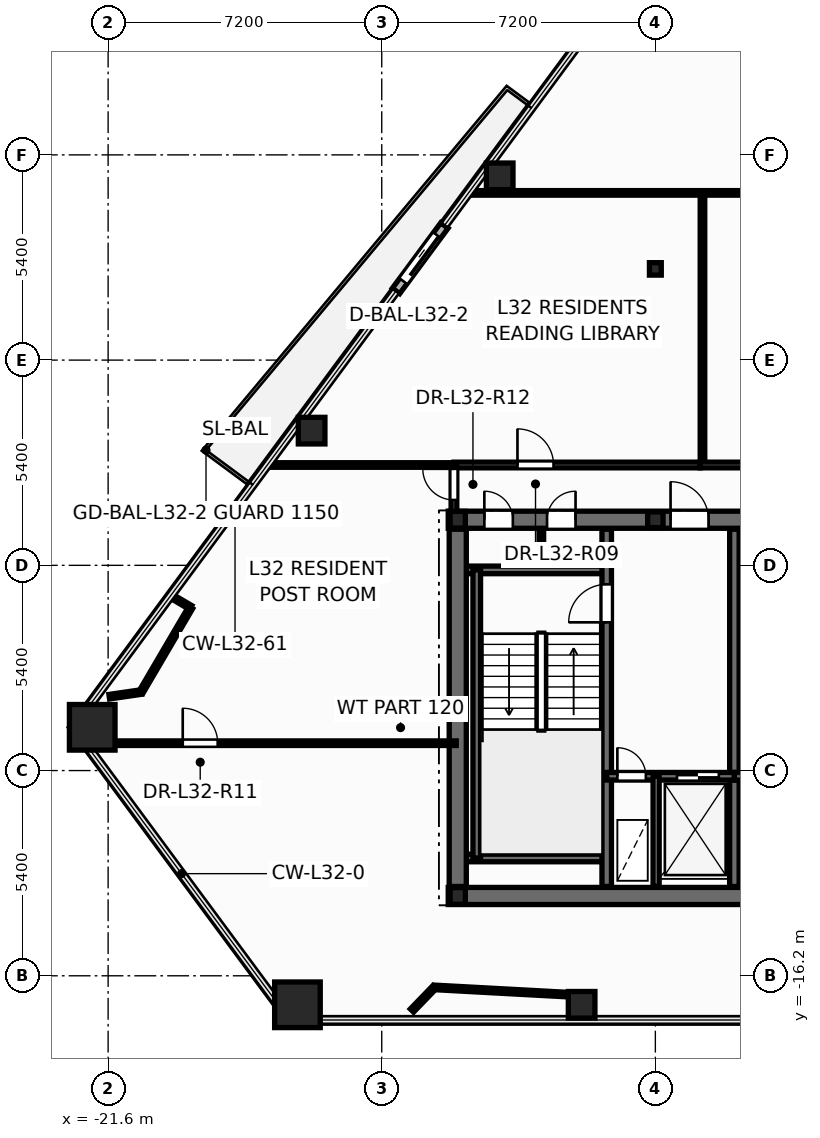
"""IFC4 building model, lengths in metres.
Left out: names, types, materials, properties, quantities, classifications, styles, units other than length and angle.
Written with IfcOpenShell. Run it as: python <this file> out.ifc"""

import sys

from ifc_helpers import new_model, si_unit, direction, frame, frame_2d, origin, origin_2d, place, context, subcontext, project, spatial, rectangle, hollow_rectangle, hollow_circle, i_section, extrude, element, fill, save


model = new_model("IFC4")
c1 = context("Model", 3, precision=1e-05, world=origin(), true_north=direction((0.0, 1.0)))
c2 = subcontext(c1, "Body", "Model", "MODEL_VIEW")
j1 = project(units=[si_unit("LENGTHUNIT", "METRE"), si_unit("PLANEANGLEUNIT", "RADIAN")], contexts=[c1])
p1 = place(None, origin())
s1 = spatial("IfcSite", under=j1, at=p1, CompositionType="ELEMENT")
p2 = place(p1, origin())
s2 = spatial("IfcBuilding", under=s1, at=p2, CompositionType="ELEMENT")
p3 = place(p2, frame((0.0, 0.0, 125.7)))
s3 = spatial("IfcBuildingStorey", under=s2, at=p3, CompositionType="ELEMENT", Elevation=125.7)
for number, where, z_axis, x_axis in (
    (1, (-22.019, -9.662, 0.0), (0.0, 0.0, 1.0), (1.0, 0.0, 0.0)),
    (2, (-16.618, -16.963, 0.0), (0.0, 0.0, 1.0), (1.0, 0.0, 0.0)),
):
    element("IfcColumn", number, at=place(p3, frame(where, z_axis=z_axis, x_axis=x_axis)), inside=s3, PredefinedType="COLUMN", context=c2, shape_type="SweptSolid", body=[
        extrude(hollow_rectangle(XDim=1.2, YDim=1.2, WallThickness=0.055, at=origin_2d()), origin(), (0.0, 0.0, 1.0), 3.6),
    ])
for number, where, z_axis, x_axis in (
    (3, (-9.14, -16.963, 0.0), (0.0, 0.0, 1.0), (1.0, 0.0, 0.0)),
    (4, (-11.296, 4.836, 0.0), (0.0, 0.0, 1.0), (1.0, 0.0, 0.0)),
    (5, (-16.245, -1.856, 0.0), (0.0, 0.0, 1.0), (1.0, 0.0, 0.0)),
):
    element("IfcColumn", number, at=place(p3, frame(where, z_axis=z_axis, x_axis=x_axis)), inside=s3, PredefinedType="COLUMN", context=c2, shape_type="SweptSolid", body=[
        extrude(hollow_circle(Radius=0.35, WallThickness=0.03, at=origin_2d()), origin(), (0.0, 0.0, 1.0), 3.6),
    ])
for number, where, z_axis, x_axis in (
    (6, (-12.4, -14.1, 0.0), (0.0, 0.0, 1.0), (1.0, 0.0, 0.0)),
    (7, (-12.4, -4.2, 0.0), (0.0, 0.0, 1.0), (1.0, 0.0, 0.0)),
):
    element("IfcColumn", number, at=place(p3, frame(where, z_axis=z_axis, x_axis=x_axis)), inside=s3, PredefinedType="COLUMN", context=c2, shape_type="SweptSolid", body=[
        extrude(i_section(OverallWidth=0.4, OverallDepth=0.44, WebThickness=0.028, FlangeThickness=0.04, at=origin_2d()), origin(), (0.0, 0.0, 1.0), 3.6),
    ])
p4 = place(p3, frame((-7.2, -4.2, 0.0), z_axis=(0.0, 0.0, 1.0), x_axis=(1.0, 0.0, 0.0)))
e8 = element("IfcColumn", 8, at=p4, inside=s3, PredefinedType="PILASTER", context=c2, shape_type="SweptSolid", body=[
    extrude(i_section(OverallWidth=0.405, OverallDepth=0.414, WebThickness=0.022, FlangeThickness=0.032, at=origin_2d()), origin(), (0.0, 0.0, 1.0), 3.6),
])
p5 = place(p3, frame((-7.2, 2.4, 0.0), z_axis=(0.0, 0.0, 1.0), x_axis=(1.0, 0.0, 0.0)))
e9 = element("IfcColumn", 9, at=p5, inside=s3, PredefinedType="COLUMN", context=c2, shape_type="SweptSolid", body=[
    extrude(i_section(OverallWidth=0.311, OverallDepth=0.327, WebThickness=0.016, FlangeThickness=0.025, at=origin_2d()), origin(), (0.0, 0.0, 1.0), 3.6),
])
p6 = place(p3, frame((-12.751, 3.541, -0.015), z_axis=(0.0, 0.0, 1.0), x_axis=(-0.594638042479, -0.80399353134, 0.0)))
e10 = element("IfcWall", 10, at=p6, inside=s3, PredefinedType="STANDARD", context=c2, shape_type="SweptSolid", body=[
    extrude(rectangle(XDim=2.14, YDim=0.24, at=frame_2d((1.07, 0.0))), origin(), (0.0, 0.0, 1.0), 2.807),
])
p7 = place(p6, frame((0.32, 0.0, 0.015)))
e11 = element("IfcOpeningElement", 11, at=p7, cuts=e10, PredefinedType="OPENING", context=c2, shape_type="SweptSolid", body=[
    extrude(rectangle(XDim=1.506, YDim=2.204, at=frame_2d((0.75, 1.102))), frame((0.0, 0.13, 0.0), z_axis=(0.0, -1.0, 0.0), x_axis=(1.0, 0.0, 0.0)), (0.0, 0.0, 1.0), 0.26),
])
p8 = place(p3, frame((-5.12, -9.45, 0.0), z_axis=(0.0, 0.0, 1.0), x_axis=(1.0, 0.0, 0.0)))
e12 = element("IfcWall", 12, at=p8, inside=s3, PredefinedType="PARTITIONING", context=c2, shape_type="SweptSolid", body=[
    extrude(rectangle(XDim=3.06, YDim=0.15, at=frame_2d((1.53, 0.0))), origin(), (0.0, 0.0, 1.0), 3.35),
])
p9 = place(p3, frame((-10.2, -5.52, 0.0), z_axis=(0.0, 0.0, 1.0), x_axis=(0.0, 1.0, 0.0)))
e13 = element("IfcWall", 13, at=p9, inside=s3, PredefinedType="PARTITIONING", context=c2, shape_type="SweptSolid", body=[
    extrude(rectangle(XDim=1.12, YDim=0.12, at=frame_2d((0.56, 0.0))), origin(), (0.0, 0.0, 1.0), 3.35),
])
p10 = place(p3, frame((-12.65, -14.1, 0.0), z_axis=(0.0, 0.0, 1.0), x_axis=(1.0, 0.0, 0.0)))
e14 = element("IfcWall", 14, at=p10, inside=s3, PredefinedType="SHEAR", context=c2, shape_type="SweptSolid", body=[
    extrude(rectangle(XDim=25.3, YDim=0.45, at=frame_2d((12.65, 0.0))), origin(), (0.0, 0.0, 1.0), 3.6),
])
p11 = place(p3, frame((-12.65, -4.2, 0.0), z_axis=(0.0, 0.0, 1.0), x_axis=(1.0, 0.0, 0.0)))
e15 = element("IfcWall", 15, at=p11, inside=s3, PredefinedType="SHEAR", context=c2, shape_type="SweptSolid", body=[
    extrude(rectangle(XDim=25.3, YDim=0.45, at=frame_2d((12.65, 0.0))), origin(), (0.0, 0.0, 1.0), 3.6),
])
p12 = place(p11, frame((0.95, 0.0, 0.0)))
e16 = element("IfcOpeningElement", 16, at=p12, cuts=e15, PredefinedType="OPENING", context=c2, shape_type="SweptSolid", body=[
    extrude(rectangle(XDim=0.756, YDim=2.054, at=frame_2d((0.375, 1.027))), frame((0.0, 0.235, 0.0), z_axis=(0.0, -1.0, 0.0), x_axis=(1.0, 0.0, 0.0)), (0.0, 0.0, 1.0), 0.47),
])
p13 = place(p11, frame((2.6, 0.0, 0.0)))
e17 = element("IfcOpeningElement", 17, at=p13, cuts=e15, PredefinedType="OPENING", context=c2, shape_type="SweptSolid", body=[
    extrude(rectangle(XDim=0.756, YDim=2.054, at=frame_2d((0.375, 1.027))), frame((0.0, 0.235, 0.0), z_axis=(0.0, -1.0, 0.0), x_axis=(1.0, 0.0, 0.0)), (0.0, 0.0, 1.0), 0.47),
])
p14 = place(p11, frame((21.85, 0.0, 0.0)))
e18 = element("IfcOpeningElement", 18, at=p14, cuts=e15, PredefinedType="OPENING", context=c2, shape_type="SweptSolid", body=[
    extrude(rectangle(XDim=0.756, YDim=2.054, at=frame_2d((0.375, 1.027))), frame((0.0, 0.235, 0.0), z_axis=(0.0, -1.0, 0.0), x_axis=(1.0, 0.0, 0.0)), (0.0, 0.0, 1.0), 0.47),
])
p15 = place(p11, frame((23.5, 0.0, 0.0)))
e19 = element("IfcOpeningElement", 19, at=p15, cuts=e15, PredefinedType="OPENING", context=c2, shape_type="SweptSolid", body=[
    extrude(rectangle(XDim=0.756, YDim=2.054, at=frame_2d((0.375, 1.027))), frame((0.0, 0.235, 0.0), z_axis=(0.0, -1.0, 0.0), x_axis=(1.0, 0.0, 0.0)), (0.0, 0.0, 1.0), 0.47),
])
p16 = place(p11, frame((5.85, 0.0, 0.0)))
e20 = element("IfcOpeningElement", 20, at=p16, cuts=e15, PredefinedType="OPENING", context=c2, shape_type="SweptSolid", body=[
    extrude(rectangle(XDim=1.006, YDim=2.104, at=frame_2d((0.5, 1.052))), frame((0.0, 0.235, 0.0), z_axis=(0.0, -1.0, 0.0), x_axis=(1.0, 0.0, 0.0)), (0.0, 0.0, 1.0), 0.47),
])
p17 = place(p11, frame((10.35, 0.0, 0.0)))
e21 = element("IfcOpeningElement", 21, at=p17, cuts=e15, PredefinedType="OPENING", context=c2, shape_type="SweptSolid", body=[
    extrude(rectangle(XDim=1.406, YDim=2.154, at=frame_2d((0.7, 1.077))), frame((0.0, 0.235, 0.0), z_axis=(0.0, -1.0, 0.0), x_axis=(1.0, 0.0, 0.0)), (0.0, 0.0, 1.0), 0.47),
])
p18 = place(p11, frame((18.45, 0.0, 0.0)))
e22 = element("IfcOpeningElement", 22, at=p18, cuts=e15, PredefinedType="OPENING", context=c2, shape_type="SweptSolid", body=[
    extrude(rectangle(XDim=1.006, YDim=2.104, at=frame_2d((0.5, 1.052))), frame((0.0, 0.235, 0.0), z_axis=(0.0, -1.0, 0.0), x_axis=(1.0, 0.0, 0.0)), (0.0, 0.0, 1.0), 0.47),
])
for number, where, z_axis, x_axis in (
    (23, (-12.35, -5.52, 0.0), (0.0, 0.0, 1.0), (1.0, 0.0, 0.0)),
    (24, (-12.35, -13.1, 0.0), (0.0, 0.0, 1.0), (1.0, 0.0, 0.0)),
):
    element("IfcWall", number, at=place(p3, frame(where, z_axis=z_axis, x_axis=x_axis)), inside=s3, PredefinedType="SOLIDWALL", context=c2, shape_type="SweptSolid", body=[
        extrude(rectangle(XDim=3.87, YDim=0.2, at=frame_2d((1.935, 0.0))), origin(), (0.0, 0.0, 1.0), 3.6),
    ])
p19 = place(p3, frame((-11.9, -13.1, 0.0), z_axis=(0.0, 0.0, 1.0), x_axis=(0.0, 1.0, 0.0)))
e25 = element("IfcWall", 25, at=p19, inside=s3, PredefinedType="SOLIDWALL", context=c2, shape_type="SweptSolid", body=[
    extrude(rectangle(XDim=7.58, YDim=0.2, at=frame_2d((3.79, 0.0))), origin(), (0.0, 0.0, 1.0), 3.6),
])
p20 = place(p3, frame((-8.48, -13.85, 0.0), z_axis=(0.0, 0.0, 1.0), x_axis=(0.0, 1.0, 0.0)))
e26 = element("IfcWall", 26, at=p20, inside=s3, PredefinedType="SHEAR", context=c2, shape_type="SweptSolid", body=[
    extrude(rectangle(XDim=9.4, YDim=0.25, at=frame_2d((4.7, 0.0))), origin(), (0.0, 0.0, 1.0), 3.6),
])
p21 = place(p20, frame((6.95, 0.0, 0.0)))
e27 = element("IfcOpeningElement", 27, at=p21, cuts=e26, PredefinedType="OPENING", context=c2, shape_type="SweptSolid", body=[
    extrude(rectangle(XDim=1.006, YDim=2.104, at=frame_2d((0.5, 1.052))), frame((0.0, 0.135, 0.0), z_axis=(0.0, -1.0, 0.0), x_axis=(1.0, 0.0, 0.0)), (0.0, 0.0, 1.0), 0.27),
])
p22 = place(p3, frame((-5.12, -13.85, 0.0), z_axis=(0.0, 0.0, 1.0), x_axis=(0.0, 1.0, 0.0)))
e28 = element("IfcWall", 28, at=p22, inside=s3, PredefinedType="SHEAR", context=c2, shape_type="SweptSolid", body=[
    extrude(rectangle(XDim=9.4, YDim=0.25, at=frame_2d((4.7, 0.0))), origin(), (0.0, 0.0, 1.0), 3.6),
])
p23 = place(p3, frame((-8.48, -10.95, 0.0), z_axis=(0.0, 0.0, 1.0), x_axis=(1.0, 0.0, 0.0)))
e29 = element("IfcWall", 29, at=p23, inside=s3, PredefinedType="SOLIDWALL", context=c2, shape_type="SweptSolid", body=[
    extrude(rectangle(XDim=3.36, YDim=0.2, at=frame_2d((1.68, 0.0))), origin(), (0.0, 0.0, 1.0), 3.6),
])
p24 = place(p23, frame((0.28, 0.0, 0.0)))
e30 = element("IfcOpeningElement", 30, at=p24, cuts=e29, PredefinedType="OPENING", context=c2, shape_type="SweptSolid", body=[
    extrude(rectangle(XDim=0.756, YDim=2.054, at=frame_2d((0.375, 1.027))), frame((0.0, 0.11, 0.0), z_axis=(0.0, -1.0, 0.0), x_axis=(1.0, 0.0, 0.0)), (0.0, 0.0, 1.0), 0.22),
])
p25 = place(p23, frame((1.85, 0.0, 0.0)))
e31 = element("IfcOpeningElement", 31, at=p25, cuts=e29, PredefinedType="OPENING", context=c2, shape_type="SweptSolid", body=[
    extrude(rectangle(XDim=1.106, YDim=2.104, at=frame_2d((0.55, 1.052))), frame((0.0, 0.11, 0.0), z_axis=(0.0, -1.0, 0.0), x_axis=(1.0, 0.0, 0.0)), (0.0, 0.0, 1.0), 0.22),
])
p26 = place(p3, frame((-5.12, -10.95, 0.0), z_axis=(0.0, 0.0, 1.0), x_axis=(1.0, 0.0, 0.0)))
e32 = element("IfcWall", 32, at=p26, inside=s3, PredefinedType="SOLIDWALL", context=c2, shape_type="SweptSolid", body=[
    extrude(rectangle(XDim=10.24, YDim=0.2, at=frame_2d((5.12, 0.0))), origin(), (0.0, 0.0, 1.0), 3.6),
])
p27 = place(p26, frame((0.6, 0.0, 0.0)))
e33 = element("IfcOpeningElement", 33, at=p27, cuts=e32, PredefinedType="OPENING", context=c2, shape_type="SweptSolid", body=[
    extrude(rectangle(XDim=1.106, YDim=2.104, at=frame_2d((0.55, 1.052))), frame((0.0, 0.11, 0.0), z_axis=(0.0, -1.0, 0.0), x_axis=(1.0, 0.0, 0.0)), (0.0, 0.0, 1.0), 0.22),
])
p28 = place(p26, frame((2.67, 0.0, 0.0)))
e34 = element("IfcOpeningElement", 34, at=p28, cuts=e32, PredefinedType="OPENING", context=c2, shape_type="SweptSolid", body=[
    extrude(rectangle(XDim=1.106, YDim=2.104, at=frame_2d((0.55, 1.052))), frame((0.0, 0.11, 0.0), z_axis=(0.0, -1.0, 0.0), x_axis=(1.0, 0.0, 0.0)), (0.0, 0.0, 1.0), 0.22),
])
p29 = place(p26, frame((4.57, 0.0, 0.0)))
e35 = element("IfcOpeningElement", 35, at=p29, cuts=e32, PredefinedType="OPENING", context=c2, shape_type="SweptSolid", body=[
    extrude(rectangle(XDim=1.106, YDim=2.104, at=frame_2d((0.55, 1.052))), frame((0.0, 0.11, 0.0), z_axis=(0.0, -1.0, 0.0), x_axis=(1.0, 0.0, 0.0)), (0.0, 0.0, 1.0), 0.22),
])
p30 = place(p26, frame((6.47, 0.0, 0.0)))
e36 = element("IfcOpeningElement", 36, at=p30, cuts=e32, PredefinedType="OPENING", context=c2, shape_type="SweptSolid", body=[
    extrude(rectangle(XDim=1.106, YDim=2.104, at=frame_2d((0.55, 1.052))), frame((0.0, 0.11, 0.0), z_axis=(0.0, -1.0, 0.0), x_axis=(1.0, 0.0, 0.0)), (0.0, 0.0, 1.0), 0.22),
])
p31 = place(p26, frame((8.54, 0.0, 0.0)))
e37 = element("IfcOpeningElement", 37, at=p31, cuts=e32, PredefinedType="OPENING", context=c2, shape_type="SweptSolid", body=[
    extrude(rectangle(XDim=1.106, YDim=2.104, at=frame_2d((0.55, 1.052))), frame((0.0, 0.11, 0.0), z_axis=(0.0, -1.0, 0.0), x_axis=(1.0, 0.0, 0.0)), (0.0, 0.0, 1.0), 0.22),
])
p32 = place(p3, frame((-7.18, -13.85, 0.0), z_axis=(0.0, 0.0, 1.0), x_axis=(0.0, 1.0, 0.0)))
e38 = element("IfcWall", 38, at=p32, inside=s3, PredefinedType="PARTITIONING", context=c2, shape_type="SweptSolid", body=[
    extrude(rectangle(XDim=2.9, YDim=0.16, at=frame_2d((1.45, 0.0))), origin(), (0.0, 0.0, 1.0), 2.475),
])
p33 = place(p3, frame((-12.4, -13.85, 0.0), z_axis=(0.0, 0.0, 1.0), x_axis=(0.0, 1.0, 0.0)))
e39 = element("IfcWall", 39, at=p33, inside=s3, PredefinedType="SHEAR", context=c2, shape_type="SweptSolid", body=[
    extrude(rectangle(XDim=9.4, YDim=0.45, at=frame_2d((4.7, 0.0))), origin(), (0.0, 0.0, 1.0), 3.6),
])
p34 = place(p3, frame((-22.207, -10.08, 0.0), z_axis=(0.0, 0.0, 1.0), x_axis=(1.0, 0.0, 0.0)))
e40 = element("IfcWall", 40, at=p34, inside=s3, PredefinedType="PARTITIONING", context=c2, shape_type="SweptSolid", body=[
    extrude(rectangle(XDim=9.767, YDim=0.12, at=frame_2d((4.883, 0.0))), origin(), (0.0, 0.0, 1.0), 2.792),
])
p35 = place(p34, frame((2.57, 0.0, 0.0)))
e41 = element("IfcOpeningElement", 41, at=p35, cuts=e40, PredefinedType="OPENING", context=c2, shape_type="SweptSolid", body=[
    extrude(rectangle(XDim=0.926, YDim=2.104, at=frame_2d((0.46, 1.052))), frame((0.0, 0.07, 0.0), z_axis=(0.0, -1.0, 0.0), x_axis=(1.0, 0.0, 0.0)), (0.0, 0.0, 1.0), 0.14),
])
p36 = place(p3, frame((-5.96, -2.76, 0.0), z_axis=(0.0, 0.0, 1.0), x_axis=(0.0, 1.0, 0.0)))
e42 = element("IfcWall", 42, at=p36, inside=s3, PredefinedType="PARTITIONING", context=c2, shape_type="SweptSolid", body=[
    extrude(rectangle(XDim=7.16, YDim=0.12, at=frame_2d((3.58, 0.0))), origin(), (0.0, 0.0, 1.0), 2.325),
])
p37 = place(p3, frame((-6.02, -2.76, 0.0), z_axis=(0.0, 0.0, 1.0), x_axis=(1.0, 0.0, 0.0)))
e43 = element("IfcWall", 43, at=p37, inside=s3, PredefinedType="PARTITIONING", context=c2, shape_type="SweptSolid", body=[
    extrude(rectangle(XDim=6.66, YDim=0.15, at=frame_2d((3.33, 0.0))), origin(), (0.0, 0.0, 1.0), 2.325),
])
p38 = place(p3, frame((-12.116, 4.4, 0.0), z_axis=(0.0, 0.0, 1.0), x_axis=(1.0, 0.0, 0.0)))
e44 = element("IfcWall", 44, at=p38, inside=s3, PredefinedType="PARTITIONING", context=c2, shape_type="SweptSolid", body=[
    extrude(rectangle(XDim=12.756, YDim=0.12, at=frame_2d((6.378, 0.0))), origin(), (0.0, 0.0, 1.0), 2.325),
])
p39 = place(p3, frame((-12.5, -2.76, 0.0), z_axis=(0.0, 0.0, 1.0), x_axis=(1.0, 0.0, 0.0)))
e45 = element("IfcWall", 45, at=p39, inside=s3, PredefinedType="PARTITIONING", context=c2, shape_type="SweptSolid", body=[
    extrude(rectangle(XDim=6.478, YDim=0.15, at=frame_2d((3.239, 0.0))), origin(), (0.0, 0.0, 1.0), 2.325),
])
p40 = place(p39, frame((1.671, 0.0, 0.0)))
e46 = element("IfcOpeningElement", 46, at=p40, cuts=e45, PredefinedType="OPENING", context=c2, shape_type="SweptSolid", body=[
    extrude(rectangle(XDim=0.956, YDim=2.104, at=frame_2d((0.475, 1.052))), frame((0.0, 0.085, 0.0), z_axis=(0.0, -1.0, 0.0), x_axis=(1.0, 0.0, 0.0)), (0.0, 0.0, 1.0), 0.17),
])
p41 = place(p3, frame((-17.411, -2.76, 0.0), z_axis=(0.0, 0.0, 1.0), x_axis=(1.0, 0.0, 0.0)))
e47 = element("IfcWall", 47, at=p41, inside=s3, PredefinedType="PARTITIONING", context=c2, shape_type="SweptSolid", body=[
    extrude(rectangle(XDim=4.971, YDim=0.12, at=frame_2d((2.486, 0.0))), origin(), (0.0, 0.0, 1.0), 2.792),
])
p42 = place(p3, frame((-13.016, -16.505, 0.0), z_axis=(0.0, 0.0, 1.0), x_axis=(0.998537679812, -0.054060170142, 0.0)))
e48 = element("IfcWall", 48, at=p42, inside=s3, PredefinedType="PARTITIONING", context=c2, shape_type="SweptSolid", body=[
    extrude(rectangle(XDim=3.952, YDim=0.12, at=frame_2d((1.976, 0.0))), origin(), (0.0, 0.0, 1.0), 2.325),
])
p43 = place(p3, frame((-19.428, -6.51, 0.0), z_axis=(0.0, 0.0, 1.0), x_axis=(-0.505993956434, -0.862537023004, 0.0)))
e49 = element("IfcWall", 49, at=p43, inside=s3, PredefinedType="PARTITIONING", context=c2, shape_type="SweptSolid", body=[
    extrude(rectangle(XDim=2.579, YDim=0.12, at=frame_2d((1.29, 0.0))), origin(), (0.0, 0.0, 1.0), 2.325),
])
p44 = place(p3, frame((-12.5, -4.24, 0.0), z_axis=(0.0, 0.0, 1.0), x_axis=(0.0, 1.0, 0.0)))
e50 = element("IfcWall", 50, at=p44, inside=s3, PredefinedType="PARTITIONING", context=c2, shape_type="SweptSolid", body=[
    extrude(rectangle(XDim=1.48, YDim=0.15, at=frame_2d((0.74, 0.0))), origin(), (0.0, 0.0, 1.0), 2.325),
])
p45 = place(p44, frame((0.56, 0.0, 0.0)))
e51 = element("IfcOpeningElement", 51, at=p45, cuts=e50, PredefinedType="OPENING", context=c2, shape_type="SweptSolid", body=[
    extrude(rectangle(XDim=0.826, YDim=2.104, at=frame_2d((0.41, 1.052))), frame((0.0, 0.085, 0.0), z_axis=(0.0, -1.0, 0.0), x_axis=(1.0, 0.0, 0.0)), (0.0, 0.0, 1.0), 0.17),
])
p46 = place(p3, frame((-13.605, -17.115, 0.0), z_axis=(0.0, 0.0, 1.0), x_axis=(0.69475899008, 0.719242619498, 0.0)))
e52 = element("IfcWall", 52, at=p46, inside=s3, PredefinedType="PARTITIONING", context=c2, shape_type="SweptSolid", body=[
    extrude(rectangle(XDim=0.848, YDim=0.12, at=frame_2d((0.424, 0.0))), origin(), (0.0, 0.0, 1.0), 2.792),
])
p47 = place(p3, frame((-20.733, -8.735, 0.0), z_axis=(0.0, 0.0, 1.0), x_axis=(-0.989670684279, -0.143359466653, 0.0)))
e53 = element("IfcWall", 53, at=p47, inside=s3, PredefinedType="PARTITIONING", context=c2, shape_type="SweptSolid", body=[
    extrude(rectangle(XDim=0.846, YDim=0.12, at=frame_2d((0.423, 0.0))), origin(), (0.0, 0.0, 1.0), 2.325),
])
p48 = place(p3, frame((-9.07, -16.719, 0.0), z_axis=(0.0, 0.0, 1.0), x_axis=(-0.053788890406, -0.99855232976, 0.0)))
e54 = element("IfcWall", 54, at=p48, inside=s3, PredefinedType="PARTITIONING", context=c2, shape_type="SweptSolid", body=[
    extrude(rectangle(XDim=0.635, YDim=0.12, at=frame_2d((0.318, 0.0))), origin(), (0.0, 0.0, 1.0), 2.325),
])
p49 = place(p3, frame((-19.947, -6.206, 0.0), z_axis=(0.0, 0.0, 1.0), x_axis=(0.86267356237, -0.505761134121, 0.0)))
e55 = element("IfcWall", 55, at=p49, inside=s3, PredefinedType="PARTITIONING", context=c2, shape_type="SweptSolid", body=[
    extrude(rectangle(XDim=0.602, YDim=0.12, at=frame_2d((0.301, 0.0))), origin(), (0.0, 0.0, 1.0), 2.792),
])
p50 = place(p7, origin())
e56 = element("IfcDoor", 56, at=p50, inside=s3, OperationType="SLIDING_TO_RIGHT", PredefinedType="DOOR", context=c2, shape_type="SweptSolid", body=[
    extrude(rectangle(XDim=1.5, YDim=2.2, at=frame_2d((0.75, 1.1))), frame((0.0, 0.025, 0.0), z_axis=(0.0, -1.0, 0.0), x_axis=(1.0, 0.0, 0.0)), (0.0, 0.0, 1.0), 0.05),
])
fill(e11, e56)
p51 = place(p21, origin())
e57 = element("IfcDoor", 57, at=p51, inside=s3, OperationType="SINGLE_SWING_LEFT", PredefinedType="DOOR", context=c2, shape_type="SweptSolid", body=[
    extrude(rectangle(XDim=1.0, YDim=2.1, at=frame_2d((0.5, 1.05))), frame((0.0, 0.025, 0.0), z_axis=(0.0, -1.0, 0.0), x_axis=(1.0, 0.0, 0.0)), (0.0, 0.0, 1.0), 0.05),
])
fill(e27, e57)
p52 = place(p24, origin())
e58 = element("IfcDoor", 58, at=p52, inside=s3, OperationType="SINGLE_SWING_LEFT", PredefinedType="DOOR", context=c2, shape_type="SweptSolid", body=[
    extrude(rectangle(XDim=0.75, YDim=2.05, at=frame_2d((0.375, 1.025))), frame((0.0, 0.025, 0.0), z_axis=(0.0, -1.0, 0.0), x_axis=(1.0, 0.0, 0.0)), (0.0, 0.0, 1.0), 0.05),
])
fill(e30, e58)
p53 = place(p25, origin())
e59 = element("IfcDoor", 59, at=p53, inside=s3, OperationType="DOUBLE_DOOR_SLIDING", PredefinedType="DOOR", context=c2, shape_type="SweptSolid", body=[
    extrude(rectangle(XDim=1.1, YDim=2.1, at=frame_2d((0.55, 1.05))), frame((0.0, 0.025, 0.0), z_axis=(0.0, -1.0, 0.0), x_axis=(1.0, 0.0, 0.0)), (0.0, 0.0, 1.0), 0.05),
])
fill(e31, e59)
p54 = place(p12, origin())
e60 = element("IfcDoor", 60, at=p54, inside=s3, OperationType="SINGLE_SWING_LEFT", PredefinedType="DOOR", context=c2, shape_type="SweptSolid", body=[
    extrude(rectangle(XDim=0.75, YDim=2.05, at=frame_2d((0.375, 1.025))), frame((0.0, 0.025, 0.0), z_axis=(0.0, -1.0, 0.0), x_axis=(1.0, 0.0, 0.0)), (0.0, 0.0, 1.0), 0.05),
])
fill(e16, e60)
p55 = place(p13, origin())
e61 = element("IfcDoor", 61, at=p55, inside=s3, OperationType="SINGLE_SWING_RIGHT", PredefinedType="DOOR", context=c2, shape_type="SweptSolid", body=[
    extrude(rectangle(XDim=0.75, YDim=2.05, at=frame_2d((0.375, 1.025))), frame((0.0, 0.025, 0.0), z_axis=(0.0, -1.0, 0.0), x_axis=(1.0, 0.0, 0.0)), (0.0, 0.0, 1.0), 0.05),
])
fill(e17, e61)
p56 = place(p16, origin())
e62 = element("IfcDoor", 62, at=p56, inside=s3, OperationType="SINGLE_SWING_LEFT", PredefinedType="DOOR", context=c2, shape_type="SweptSolid", body=[
    extrude(rectangle(XDim=1.0, YDim=2.1, at=frame_2d((0.5, 1.05))), frame((0.0, 0.025, 0.0), z_axis=(0.0, -1.0, 0.0), x_axis=(1.0, 0.0, 0.0)), (0.0, 0.0, 1.0), 0.05),
])
fill(e20, e62)
p57 = place(p40, origin())
e63 = element("IfcDoor", 63, at=p57, inside=s3, OperationType="SINGLE_SWING_LEFT", PredefinedType="DOOR", context=c2, shape_type="SweptSolid", body=[
    extrude(rectangle(XDim=0.95, YDim=2.1, at=frame_2d((0.475, 1.05))), frame((0.0, 0.025, 0.0), z_axis=(0.0, -1.0, 0.0), x_axis=(1.0, 0.0, 0.0)), (0.0, 0.0, 1.0), 0.05),
])
fill(e46, e63)
p58 = place(p35, origin())
e64 = element("IfcDoor", 64, at=p58, inside=s3, OperationType="SINGLE_SWING_LEFT", PredefinedType="DOOR", context=c2, shape_type="SweptSolid", body=[
    extrude(rectangle(XDim=0.92, YDim=2.1, at=frame_2d((0.46, 1.05))), frame((0.0, 0.025, 0.0), z_axis=(0.0, -1.0, 0.0), x_axis=(1.0, 0.0, 0.0)), (0.0, 0.0, 1.0), 0.05),
])
fill(e41, e64)
p59 = place(p45, origin())
e65 = element("IfcDoor", 65, at=p59, inside=s3, OperationType="SINGLE_SWING_RIGHT", PredefinedType="DOOR", context=c2, shape_type="SweptSolid", body=[
    extrude(rectangle(XDim=0.82, YDim=2.1, at=frame_2d((0.41, 1.05))), frame((0.0, 0.025, 0.0), z_axis=(0.0, -1.0, 0.0), x_axis=(1.0, 0.0, 0.0)), (0.0, 0.0, 1.0), 0.05),
])
fill(e51, e65)
save(model, sys.argv[1])
